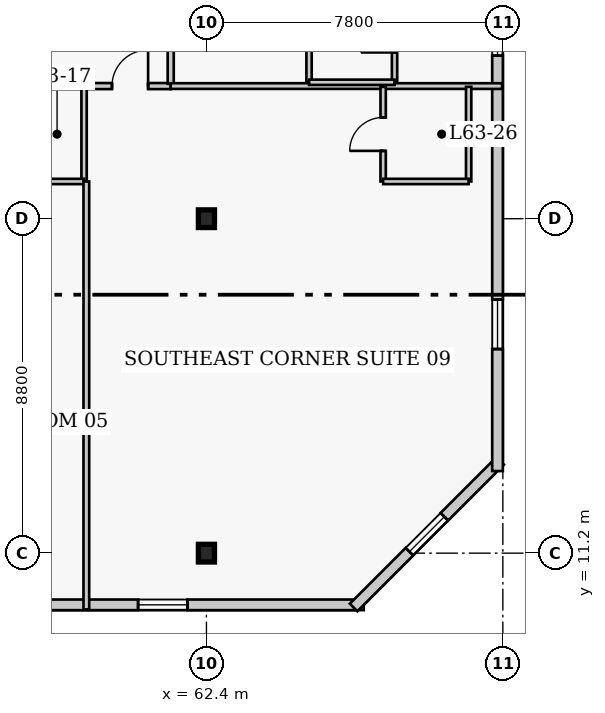
"""IFC4 building model, lengths in metres.
Left out: names, types, materials, properties, quantities, classifications, styles, units other than length and angle.
Written with IfcOpenShell. Run it as: python <this file> out.ifc"""

import sys

from ifc_helpers import new_model, si_unit, direction, frame, frame_2d, origin, origin_2d, place, context, subcontext, project, spatial, rectangle, i_section, extrude, element, fill, save


model = new_model("IFC4")
c1 = context("Model", 3, precision=1e-05, world=origin(), true_north=direction((0.0, 1.0)))
c2 = subcontext(c1, "Body", "Model", "MODEL_VIEW")
j1 = project(units=[si_unit("LENGTHUNIT", "METRE"), si_unit("PLANEANGLEUNIT", "RADIAN")], contexts=[c1])
p1 = place(None, origin())
s1 = spatial("IfcSite", under=j1, at=p1, CompositionType="ELEMENT")
p2 = place(p1, origin())
s2 = spatial("IfcBuilding", under=s1, at=p2, CompositionType="ELEMENT")
p3 = place(p2, frame((0.0, 0.0, 253.4)))
s3 = spatial("IfcBuildingStorey", under=s2, at=p3, CompositionType="ELEMENT", Elevation=253.4)
for number, where, z_axis, x_axis in (
    (1, (62.4, 11.2, 0.0), (0.0, 0.0, 1.0), (1.0, 0.0, 0.0)),
    (2, (62.4, 20.0, 0.0), (0.0, 0.0, 1.0), (1.0, 0.0, 0.0)),
):
    element("IfcColumn", number, at=place(p3, frame(where, z_axis=z_axis, x_axis=x_axis)), inside=s3, PredefinedType="COLUMN", context=c2, shape_type="SweptSolid", body=[
        extrude(i_section(OverallWidth=0.422, OverallDepth=0.465, WebThickness=0.045, FlangeThickness=0.073, FilletRadius=0.017, at=origin_2d()), origin(), (0.0, 0.0, 1.0), 4.0),
    ])
p4 = place(p3, frame((41.71, 9.84, 0.0), z_axis=(0.0, 0.0, 1.0), x_axis=(1.0, 0.0, 0.0)))
e3 = element("IfcWall", 3, at=p4, inside=s3, PredefinedType="SOLIDWALL", context=c2, shape_type="SweptSolid", body=[
    extrude(rectangle(XDim=24.83, YDim=0.28, at=frame_2d((12.415, 0.0))), origin(), (0.0, 0.0, 1.0), 3.76),
])
p5 = place(p4, frame((8.29, 0.0, 0.0)))
e4 = element("IfcOpeningElement", 4, at=p5, cuts=e3, PredefinedType="OPENING", context=c2, shape_type="SweptSolid", body=[
    extrude(rectangle(XDim=1.4, YDim=2.15, at=frame_2d((0.7, 1.075))), frame((0.0, 0.15, 0.0), z_axis=(0.0, -1.0, 0.0), x_axis=(1.0, 0.0, 0.0)), (0.0, 0.0, 1.0), 0.3),
])
p6 = place(p4, frame((3.488, 0.0, 0.85)))
e5 = element("IfcOpeningElement", 5, at=p6, cuts=e3, PredefinedType="OPENING", context=c2, shape_type="SweptSolid", body=[
    extrude(rectangle(XDim=1.3, YDim=1.7, at=frame_2d((0.65, 0.85))), frame((0.0, 0.15, 0.0), z_axis=(0.0, -1.0, 0.0), x_axis=(1.0, 0.0, 0.0)), (0.0, 0.0, 1.0), 0.3),
])
p7 = place(p4, frame((10.615, 0.0, 0.85)))
e6 = element("IfcOpeningElement", 6, at=p7, cuts=e3, PredefinedType="OPENING", context=c2, shape_type="SweptSolid", body=[
    extrude(rectangle(XDim=1.3, YDim=1.7, at=frame_2d((0.65, 0.85))), frame((0.0, 0.15, 0.0), z_axis=(0.0, -1.0, 0.0), x_axis=(1.0, 0.0, 0.0)), (0.0, 0.0, 1.0), 0.3),
])
p8 = place(p4, frame((18.892, 0.0, 0.85)))
e7 = element("IfcOpeningElement", 7, at=p8, cuts=e3, PredefinedType="OPENING", context=c2, shape_type="SweptSolid", body=[
    extrude(rectangle(XDim=1.3, YDim=1.7, at=frame_2d((0.65, 0.85))), frame((0.0, 0.15, 0.0), z_axis=(0.0, -1.0, 0.0), x_axis=(1.0, 0.0, 0.0)), (0.0, 0.0, 1.0), 0.3),
])
p9 = place(p4, frame((14.365, 0.0, 0.85)))
e8 = element("IfcOpeningElement", 8, at=p9, cuts=e3, PredefinedType="OPENING", context=c2, shape_type="SweptSolid", body=[
    extrude(rectangle(XDim=1.3, YDim=1.7, at=frame_2d((0.65, 0.85))), frame((0.0, 0.15, 0.0), z_axis=(0.0, -1.0, 0.0), x_axis=(1.0, 0.0, 0.0)), (0.0, 0.0, 1.0), 0.3),
])
p10 = place(p3, frame((66.273, 9.771, 0.0), z_axis=(0.0, 0.0, 1.0), x_axis=(0.707129162587, 0.707084399077, 0.0)))
e9 = element("IfcWall", 9, at=p10, inside=s3, PredefinedType="SOLIDWALL", context=c2, shape_type="SweptSolid", body=[
    extrude(rectangle(XDim=5.454, YDim=0.28, at=frame_2d((2.727, 0.0))), origin(), (0.0, 0.0, 1.0), 3.76),
])
p11 = place(p10, frame((2.077, 0.0, 0.85)))
e10 = element("IfcOpeningElement", 10, at=p11, cuts=e9, PredefinedType="OPENING", context=c2, shape_type="SweptSolid", body=[
    extrude(rectangle(XDim=1.3, YDim=1.7, at=frame_2d((0.65, 0.85))), frame((0.0, 0.15, 0.0), z_axis=(0.0, -1.0, 0.0), x_axis=(1.0, 0.0, 0.0)), (0.0, 0.0, 1.0), 0.3),
])
p12 = place(p3, frame((70.06, 13.36, 0.0), z_axis=(0.0, 0.0, 1.0), x_axis=(0.0, 1.0, 0.0)))
e11 = element("IfcWall", 11, at=p12, inside=s3, PredefinedType="SOLIDWALL", context=c2, shape_type="SweptSolid", body=[
    extrude(rectangle(XDim=30.88, YDim=0.28, at=frame_2d((15.44, 0.0))), origin(), (0.0, 0.0, 1.0), 3.76),
])
p13 = place(p12, frame((3.21, 0.0, 0.85)))
e12 = element("IfcOpeningElement", 12, at=p13, cuts=e11, PredefinedType="OPENING", context=c2, shape_type="SweptSolid", body=[
    extrude(rectangle(XDim=1.3, YDim=1.7, at=frame_2d((0.65, 0.85))), frame((0.0, 0.15, 0.0), z_axis=(0.0, -1.0, 0.0), x_axis=(1.0, 0.0, 0.0)), (0.0, 0.0, 1.0), 0.3),
])
p14 = place(p12, frame((10.93, 0.0, 0.85)))
e13 = element("IfcOpeningElement", 13, at=p14, cuts=e11, PredefinedType="OPENING", context=c2, shape_type="SweptSolid", body=[
    extrude(rectangle(XDim=1.3, YDim=1.7, at=frame_2d((0.65, 0.85))), frame((0.0, 0.15, 0.0), z_axis=(0.0, -1.0, 0.0), x_axis=(1.0, 0.0, 0.0)), (0.0, 0.0, 1.0), 0.3),
])
p15 = place(p12, frame((18.65, 0.0, 0.85)))
e14 = element("IfcOpeningElement", 14, at=p15, cuts=e11, PredefinedType="OPENING", context=c2, shape_type="SweptSolid", body=[
    extrude(rectangle(XDim=1.3, YDim=1.7, at=frame_2d((0.65, 0.85))), frame((0.0, 0.15, 0.0), z_axis=(0.0, -1.0, 0.0), x_axis=(1.0, 0.0, 0.0)), (0.0, 0.0, 1.0), 0.3),
])
p16 = place(p12, frame((26.37, 0.0, 0.85)))
e15 = element("IfcOpeningElement", 15, at=p16, cuts=e11, PredefinedType="OPENING", context=c2, shape_type="SweptSolid", body=[
    extrude(rectangle(XDim=1.3, YDim=1.7, at=frame_2d((0.65, 0.85))), frame((0.0, 0.15, 0.0), z_axis=(0.0, -1.0, 0.0), x_axis=(1.0, 0.0, 0.0)), (0.0, 0.0, 1.0), 0.3),
])
p17 = place(p3, frame((35.8, 23.49, 0.0), z_axis=(0.0, 0.0, 1.0), x_axis=(1.0, 0.0, 0.0)))
e16 = element("IfcWall", 16, at=p17, inside=s3, PredefinedType="PARTITIONING", context=c2, shape_type="SweptSolid", body=[
    extrude(rectangle(XDim=25.66, YDim=0.16, at=frame_2d((12.83, 0.0))), origin(), (0.0, 0.0, 1.0), 3.76),
])
p18 = place(p17, frame((1.555, 0.0, 0.0)))
e17 = element("IfcOpeningElement", 17, at=p18, cuts=e16, PredefinedType="OPENING", context=c2, shape_type="SweptSolid", body=[
    extrude(rectangle(XDim=0.95, YDim=2.1, at=frame_2d((0.475, 1.05))), frame((0.0, 0.09, 0.0), z_axis=(0.0, -1.0, 0.0), x_axis=(1.0, 0.0, 0.0)), (0.0, 0.0, 1.0), 0.18),
])
p19 = place(p17, frame((10.57, 0.0, 0.0)))
e18 = element("IfcOpeningElement", 18, at=p19, cuts=e16, PredefinedType="OPENING", context=c2, shape_type="SweptSolid", body=[
    extrude(rectangle(XDim=0.95, YDim=2.1, at=frame_2d((0.475, 1.05))), frame((0.0, 0.09, 0.0), z_axis=(0.0, -1.0, 0.0), x_axis=(1.0, 0.0, 0.0)), (0.0, 0.0, 1.0), 0.18),
])
p20 = place(p17, frame((15.105, 0.0, 0.0)))
e19 = element("IfcOpeningElement", 19, at=p20, cuts=e16, PredefinedType="OPENING", context=c2, shape_type="SweptSolid", body=[
    extrude(rectangle(XDim=1.0, YDim=2.15, at=frame_2d((0.5, 1.075))), frame((0.0, 0.09, 0.0), z_axis=(0.0, -1.0, 0.0), x_axis=(1.0, 0.0, 0.0)), (0.0, 0.0, 1.0), 0.18),
])
p21 = place(p17, frame((19.285, 0.0, 0.0)))
e20 = element("IfcOpeningElement", 20, at=p21, cuts=e16, PredefinedType="OPENING", context=c2, shape_type="SweptSolid", body=[
    extrude(rectangle(XDim=0.95, YDim=2.1, at=frame_2d((0.475, 1.05))), frame((0.0, 0.09, 0.0), z_axis=(0.0, -1.0, 0.0), x_axis=(1.0, 0.0, 0.0)), (0.0, 0.0, 1.0), 0.18),
])
p22 = place(p17, frame((24.115, 0.0, 0.0)))
e21 = element("IfcOpeningElement", 21, at=p22, cuts=e16, PredefinedType="OPENING", context=c2, shape_type="SweptSolid", body=[
    extrude(rectangle(XDim=0.95, YDim=2.1, at=frame_2d((0.475, 1.05))), frame((0.0, 0.09, 0.0), z_axis=(0.0, -1.0, 0.0), x_axis=(1.0, 0.0, 0.0)), (0.0, 0.0, 1.0), 0.18),
])
p23 = place(p3, frame((61.46, 23.55, 0.0), z_axis=(0.0, 0.0, 1.0), x_axis=(0.0, 1.0, 0.0)))
e22 = element("IfcWall", 22, at=p23, inside=s3, PredefinedType="PARTITIONING", context=c2, shape_type="SweptSolid", body=[
    extrude(rectangle(XDim=17.1, YDim=0.16, at=frame_2d((8.55, 0.0))), origin(), (0.0, 0.0, 1.0), 3.76),
])
p24 = place(p23, frame((2.15, 0.0, 0.0)))
e23 = element("IfcOpeningElement", 23, at=p24, cuts=e22, PredefinedType="OPENING", context=c2, shape_type="SweptSolid", body=[
    extrude(rectangle(XDim=0.95, YDim=2.1, at=frame_2d((0.475, 1.05))), frame((0.0, 0.09, 0.0), z_axis=(0.0, -1.0, 0.0), x_axis=(1.0, 0.0, 0.0)), (0.0, 0.0, 1.0), 0.18),
])
p25 = place(p23, frame((8.825, 0.0, 0.0)))
e24 = element("IfcOpeningElement", 24, at=p25, cuts=e22, PredefinedType="OPENING", context=c2, shape_type="SweptSolid", body=[
    extrude(rectangle(XDim=0.95, YDim=2.1, at=frame_2d((0.475, 1.05))), frame((0.0, 0.09, 0.0), z_axis=(0.0, -1.0, 0.0), x_axis=(1.0, 0.0, 0.0)), (0.0, 0.0, 1.0), 0.18),
])
p26 = place(p23, frame((15.66, 0.0, 0.0)))
e25 = element("IfcOpeningElement", 25, at=p26, cuts=e22, PredefinedType="OPENING", context=c2, shape_type="SweptSolid", body=[
    extrude(rectangle(XDim=1.0, YDim=2.15, at=frame_2d((0.5, 1.075))), frame((0.0, 0.09, 0.0), z_axis=(0.0, -1.0, 0.0), x_axis=(1.0, 0.0, 0.0)), (0.0, 0.0, 1.0), 0.18),
])
p27 = place(p3, frame((59.18, 20.98, 0.0), z_axis=(0.0, 0.0, 1.0), x_axis=(0.0, 1.0, 0.0)))
e26 = element("IfcWall", 26, at=p27, inside=s3, PredefinedType="PLUMBINGWALL", context=c2, shape_type="SweptSolid", body=[
    extrude(rectangle(XDim=2.49, YDim=0.14, at=frame_2d((1.245, 0.0))), origin(), (0.0, 0.0, 1.0), 3.76),
])
p28 = place(p3, frame((56.93, 20.98, 0.0), z_axis=(0.0, 0.0, 1.0), x_axis=(1.0, 0.0, 0.0)))
e27 = element("IfcWall", 27, at=p28, inside=s3, PredefinedType="PLUMBINGWALL", context=c2, shape_type="SweptSolid", body=[
    extrude(rectangle(XDim=2.25, YDim=0.14, at=frame_2d((1.125, 0.0))), origin(), (0.0, 0.0, 1.0), 3.76),
])
p29 = place(p3, frame((59.24, 9.72, 0.0), z_axis=(0.0, 0.0, 1.0), x_axis=(0.0, 1.0, 0.0)))
e28 = element("IfcWall", 28, at=p29, inside=s3, PredefinedType="PARTITIONING", context=c2, shape_type="SweptSolid", body=[
    extrude(rectangle(XDim=11.26, YDim=0.15, at=frame_2d((5.63, 0.0))), origin(), (0.0, 0.0, 1.0), 3.76),
])
p30 = place(p3, frame((61.46, 23.49, 0.0), z_axis=(0.0, 0.0, 1.0), x_axis=(1.0, 0.0, 0.0)))
e29 = element("IfcWall", 29, at=p30, inside=s3, PredefinedType="PARTITIONING", context=c2, shape_type="SweptSolid", body=[
    extrude(rectangle(XDim=8.72, YDim=0.15, at=frame_2d((4.36, 0.0))), origin(), (0.0, 0.0, 1.0), 3.76),
])
p31 = place(p3, frame((67.05, 20.98, 0.0), z_axis=(0.0, 0.0, 1.0), x_axis=(0.0, 1.0, 0.0)))
e30 = element("IfcWall", 30, at=p31, inside=s3, PredefinedType="PLUMBINGWALL", context=c2, shape_type="SweptSolid", body=[
    extrude(rectangle(XDim=2.49, YDim=0.14, at=frame_2d((1.245, 0.0))), origin(), (0.0, 0.0, 1.0), 3.76),
])
p32 = place(p31, frame((0.805, 0.0, 0.0)))
e31 = element("IfcOpeningElement", 31, at=p32, cuts=e30, PredefinedType="OPENING", context=c2, shape_type="SweptSolid", body=[
    extrude(rectangle(XDim=0.88, YDim=2.05, at=frame_2d((0.44, 1.025))), frame((0.0, 0.08, 0.0), z_axis=(0.0, -1.0, 0.0), x_axis=(1.0, 0.0, 0.0)), (0.0, 0.0, 1.0), 0.16),
])
p33 = place(p3, frame((69.3, 20.98, 0.0), z_axis=(0.0, 0.0, 1.0), x_axis=(0.0, 1.0, 0.0)))
e32 = element("IfcWall", 32, at=p33, inside=s3, PredefinedType="PLUMBINGWALL", context=c2, shape_type="SweptSolid", body=[
    extrude(rectangle(XDim=2.49, YDim=0.14, at=frame_2d((1.245, 0.0))), origin(), (0.0, 0.0, 1.0), 3.76),
])
p34 = place(p3, frame((67.05, 20.98, 0.0), z_axis=(0.0, 0.0, 1.0), x_axis=(1.0, 0.0, 0.0)))
e33 = element("IfcWall", 33, at=p34, inside=s3, PredefinedType="PLUMBINGWALL", context=c2, shape_type="SweptSolid", body=[
    extrude(rectangle(XDim=2.25, YDim=0.14, at=frame_2d((1.125, 0.0))), origin(), (0.0, 0.0, 1.0), 3.76),
])
p35 = place(p3, frame((65.1, 23.59, 0.0), z_axis=(0.0, 0.0, 1.0), x_axis=(0.0, 1.0, 0.0)))
e34 = element("IfcWall", 34, at=p35, inside=s3, PredefinedType="PLUMBINGWALL", context=c2, shape_type="SweptSolid", body=[
    extrude(rectangle(XDim=2.45, YDim=0.14, at=frame_2d((1.225, 0.0))), origin(), (0.0, 0.0, 1.0), 3.76),
])
p36 = place(p3, frame((67.35, 23.59, 0.0), z_axis=(0.0, 0.0, 1.0), x_axis=(0.0, 1.0, 0.0)))
e35 = element("IfcWall", 35, at=p36, inside=s3, PredefinedType="PLUMBINGWALL", context=c2, shape_type="SweptSolid", body=[
    extrude(rectangle(XDim=2.45, YDim=0.14, at=frame_2d((1.225, 0.0))), origin(), (0.0, 0.0, 1.0), 3.76),
])
p37 = place(p36, frame((0.785, 0.0, 0.0)))
e36 = element("IfcOpeningElement", 36, at=p37, cuts=e35, PredefinedType="OPENING", context=c2, shape_type="SweptSolid", body=[
    extrude(rectangle(XDim=0.88, YDim=2.05, at=frame_2d((0.44, 1.025))), frame((0.0, 0.08, 0.0), z_axis=(0.0, -1.0, 0.0), x_axis=(1.0, 0.0, 0.0)), (0.0, 0.0, 1.0), 0.16),
])
p38 = place(p3, frame((65.1, 23.59, 0.0), z_axis=(0.0, 0.0, 1.0), x_axis=(1.0, 0.0, 0.0)))
e37 = element("IfcWall", 37, at=p38, inside=s3, PredefinedType="PLUMBINGWALL", context=c2, shape_type="SweptSolid", body=[
    extrude(rectangle(XDim=2.25, YDim=0.14, at=frame_2d((1.125, 0.0))), origin(), (0.0, 0.0, 1.0), 3.76),
])
p39 = place(p8, origin())
e38 = element("IfcWindow", 38, at=p39, inside=s3, PartitioningType="SINGLE_PANEL", PredefinedType="WINDOW", context=c2, shape_type="SweptSolid", body=[
    extrude(rectangle(XDim=1.3, YDim=1.7, at=frame_2d((0.65, 0.85))), frame((0.0, 0.03, 0.0), z_axis=(0.0, -1.0, 0.0), x_axis=(1.0, 0.0, 0.0)), (0.0, 0.0, 1.0), 0.06),
])
fill(e7, e38)
p40 = place(p11, origin())
e39 = element("IfcWindow", 39, at=p40, inside=s3, PartitioningType="SINGLE_PANEL", PredefinedType="WINDOW", context=c2, shape_type="SweptSolid", body=[
    extrude(rectangle(XDim=1.3, YDim=1.7, at=frame_2d((0.65, 0.85))), frame((0.0, 0.03, 0.0), z_axis=(0.0, -1.0, 0.0), x_axis=(1.0, 0.0, 0.0)), (0.0, 0.0, 1.0), 0.06),
])
fill(e10, e39)
p41 = place(p13, origin())
e40 = element("IfcWindow", 40, at=p41, inside=s3, PartitioningType="SINGLE_PANEL", PredefinedType="WINDOW", context=c2, shape_type="SweptSolid", body=[
    extrude(rectangle(XDim=1.3, YDim=1.7, at=frame_2d((0.65, 0.85))), frame((0.0, 0.03, 0.0), z_axis=(0.0, -1.0, 0.0), x_axis=(1.0, 0.0, 0.0)), (0.0, 0.0, 1.0), 0.06),
])
fill(e12, e40)
p42 = place(p14, origin())
e41 = element("IfcWindow", 41, at=p42, inside=s3, PartitioningType="SINGLE_PANEL", PredefinedType="WINDOW", context=c2, shape_type="SweptSolid", body=[
    extrude(rectangle(XDim=1.3, YDim=1.7, at=frame_2d((0.65, 0.85))), frame((0.0, 0.03, 0.0), z_axis=(0.0, -1.0, 0.0), x_axis=(1.0, 0.0, 0.0)), (0.0, 0.0, 1.0), 0.06),
])
fill(e13, e41)
p43 = place(p32, origin())
e42 = element("IfcDoor", 42, at=p43, inside=s3, OperationType="SINGLE_SWING_LEFT", PredefinedType="DOOR", context=c2, shape_type="SweptSolid", body=[
    extrude(rectangle(XDim=0.88, YDim=2.05, at=frame_2d((0.44, 1.025))), frame((0.0, 0.025, 0.0), z_axis=(0.0, -1.0, 0.0), x_axis=(1.0, 0.0, 0.0)), (0.0, 0.0, 1.0), 0.05),
])
fill(e31, e42)
p44 = place(p22, origin())
e43 = element("IfcDoor", 43, at=p44, inside=s3, OperationType="SINGLE_SWING_RIGHT", PredefinedType="DOOR", context=c2, shape_type="SweptSolid", body=[
    extrude(rectangle(XDim=0.95, YDim=2.1, at=frame_2d((0.475, 1.05))), frame((0.0, 0.025, 0.0), z_axis=(0.0, -1.0, 0.0), x_axis=(1.0, 0.0, 0.0)), (0.0, 0.0, 1.0), 0.05),
])
fill(e21, e43)
p45 = place(p37, origin())
e44 = element("IfcDoor", 44, at=p45, inside=s3, OperationType="SINGLE_SWING_LEFT", PredefinedType="DOOR", context=c2, shape_type="SweptSolid", body=[
    extrude(rectangle(XDim=0.88, YDim=2.05, at=frame_2d((0.44, 1.025))), frame((0.0, 0.025, 0.0), z_axis=(0.0, -1.0, 0.0), x_axis=(1.0, 0.0, 0.0)), (0.0, 0.0, 1.0), 0.05),
])
fill(e36, e44)
save(model, sys.argv[1])
